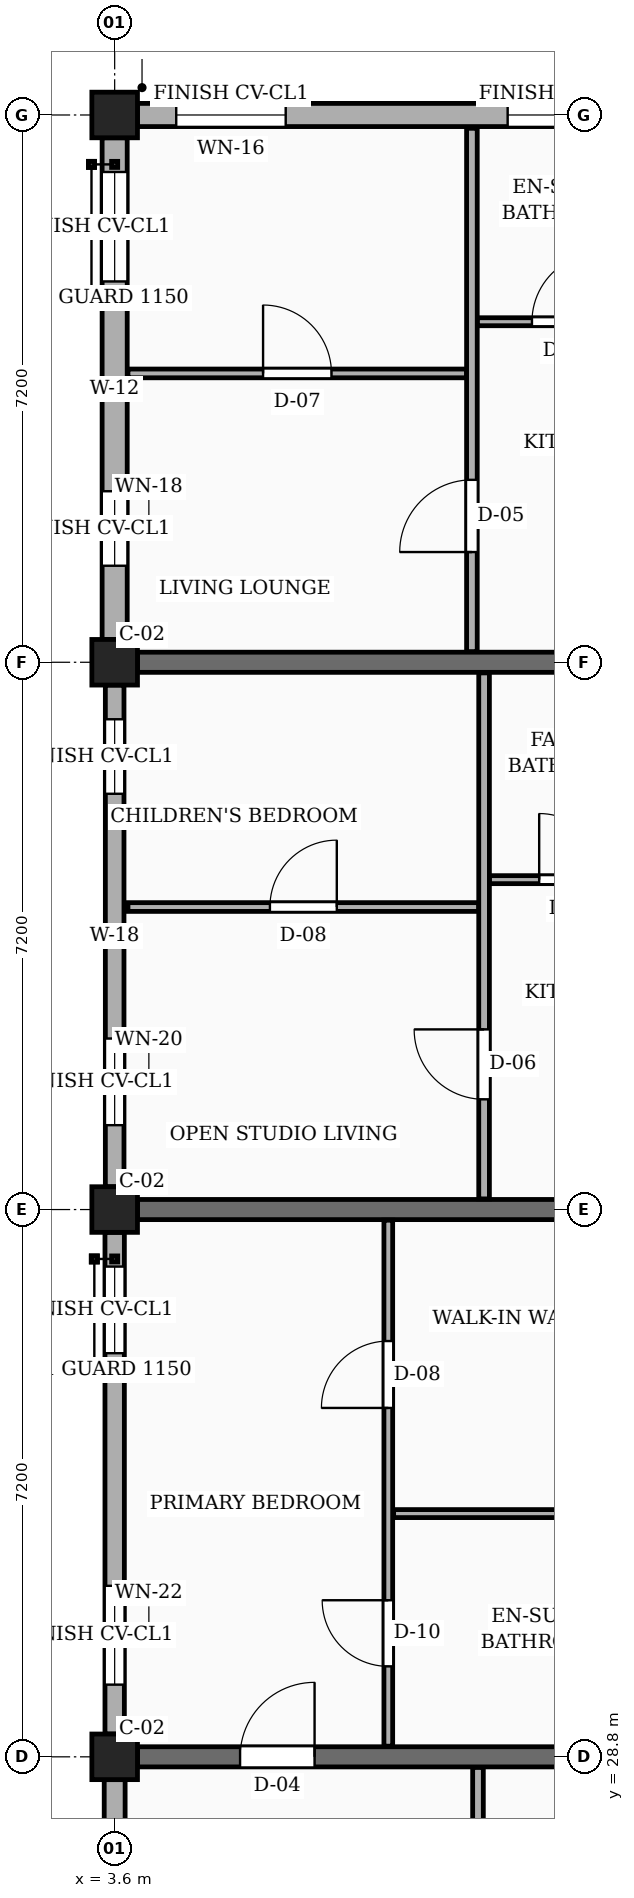
"""IFC4 building model, lengths in metres.
Left out: names, types, materials, properties, quantities, classifications, styles, units other than length and angle.
Written with IfcOpenShell. Run it as: python <this file> out.ifc"""

import sys

from ifc_helpers import new_model, si_unit, direction, frame, frame_2d, origin, origin_2d, place, context, subcontext, project, spatial, rectangle, extrude, element, fill, save


model = new_model("IFC4")
c1 = context("Model", 3, precision=1e-05, world=origin(), true_north=direction((0.0, 1.0)))
c2 = subcontext(c1, "Body", "Model", "MODEL_VIEW")
j1 = project(units=[si_unit("LENGTHUNIT", "METRE"), si_unit("PLANEANGLEUNIT", "RADIAN")], contexts=[c1])
p1 = place(None, origin())
s1 = spatial("IfcSite", under=j1, at=p1, CompositionType="ELEMENT")
p2 = place(p1, origin())
s2 = spatial("IfcBuilding", under=s1, at=p2, CompositionType="ELEMENT")
p3 = place(p2, frame((0.0, 0.0, 7.65)))
s3 = spatial("IfcBuildingStorey", under=s2, at=p3, CompositionType="ELEMENT", Elevation=7.65)
for number, where, z_axis, x_axis in (
    (1, (3.6, 28.8, 0.0), (0.0, 0.0, 1.0), (1.0, 0.0, 0.0)),
    (2, (3.6, 36.0, 0.0), (0.0, 0.0, 1.0), (1.0, 0.0, 0.0)),
    (3, (3.6, 43.2, 0.0), (0.0, 0.0, 1.0), (1.0, 0.0, 0.0)),
    (4, (3.6, 50.4, 0.0), (0.0, 0.0, 1.0), (1.0, 0.0, 0.0)),
):
    element("IfcColumn", number, at=place(p3, frame(where, z_axis=z_axis, x_axis=x_axis)), inside=s3, PredefinedType="COLUMN", context=c2, shape_type="SweptSolid", body=[
        extrude(rectangle(XDim=0.6, YDim=0.6, at=origin_2d()), origin(), (0.0, 0.0, 1.0), 3.15),
    ])
p4 = place(p3, frame((3.9, 28.8, 0.0), z_axis=(0.0, 0.0, 1.0), x_axis=(1.0, 0.0, 0.0)))
e5 = element("IfcWall", 5, at=p4, inside=s3, PredefinedType="SOLIDWALL", context=c2, shape_type="SweptSolid", body=[
    extrude(rectangle(XDim=6.575, YDim=0.265, at=frame_2d((3.288, 0.0))), origin(), (0.0, 0.0, 1.0), 2.17),
])
p5 = place(p4, frame((1.35, 0.0, 0.0)))
e6 = element("IfcOpeningElement", 6, at=p5, cuts=e5, PredefinedType="OPENING", context=c2, shape_type="SweptSolid", body=[
    extrude(rectangle(XDim=0.98, YDim=2.12, at=frame_2d((0.49, 1.06))), frame((0.0, 0.143, 0.0), z_axis=(0.0, -1.0, 0.0), x_axis=(1.0, 0.0, 0.0)), (0.0, 0.0, 1.0), 0.285),
])
for number, where, z_axis, x_axis in (
    (7, (3.9, 36.0, 0.0), (0.0, 0.0, 1.0), (1.0, 0.0, 0.0)),
    (8, (3.9, 43.2, 0.0), (0.0, 0.0, 1.0), (1.0, 0.0, 0.0)),
):
    element("IfcWall", number, at=place(p3, frame(where, z_axis=z_axis, x_axis=x_axis)), inside=s3, PredefinedType="SOLIDWALL", context=c2, shape_type="SweptSolid", body=[
        extrude(rectangle(XDim=6.575, YDim=0.265, at=frame_2d((3.288, 0.0))), origin(), (0.0, 0.0, 1.0), 2.17),
    ])
p6 = place(p3, frame((10.5, 50.4, 0.0), z_axis=(0.0, 0.0, 1.0), x_axis=(-1.0, 0.0, 0.0)))
e9 = element("IfcWall", 9, at=p6, inside=s3, PredefinedType="SOLIDWALL", context=c2, shape_type="SweptSolid", body=[
    extrude(rectangle(XDim=6.6, YDim=0.305, at=frame_2d((3.3, 0.0))), origin(), (0.0, 0.0, 1.0), 2.44),
])
p7 = place(p6, frame((0.45, 0.0, 0.78)))
e10 = element("IfcOpeningElement", 10, at=p7, cuts=e9, PredefinedType="OPENING", context=c2, shape_type="SweptSolid", body=[
    extrude(rectangle(XDim=1.28, YDim=1.26, at=frame_2d((0.64, 0.63))), frame((0.0, 0.163, 0.0), z_axis=(0.0, -1.0, 0.0), x_axis=(1.0, 0.0, 0.0)), (0.0, 0.0, 1.0), 0.325),
])
p8 = place(p6, frame((4.65, 0.0, 0.78)))
e11 = element("IfcOpeningElement", 11, at=p8, cuts=e9, PredefinedType="OPENING", context=c2, shape_type="SweptSolid", body=[
    extrude(rectangle(XDim=1.44, YDim=1.26, at=frame_2d((0.72, 0.63))), frame((0.0, 0.163, 0.0), z_axis=(0.0, -1.0, 0.0), x_axis=(1.0, 0.0, 0.0)), (0.0, 0.0, 1.0), 0.325),
])
p9 = place(p3, frame((3.6, 50.1, 0.0), z_axis=(0.0, 0.0, 1.0), x_axis=(0.0, -1.0, 0.0)))
e12 = element("IfcWall", 12, at=p9, inside=s3, PredefinedType="SOLIDWALL", context=c2, shape_type="SweptSolid", body=[
    extrude(rectangle(XDim=6.6, YDim=0.33, at=frame_2d((3.3, 0.0))), origin(), (0.0, 0.0, 1.0), 2.44),
])
p10 = place(p9, frame((0.45, 0.0, 0.78)))
e13 = element("IfcOpeningElement", 13, at=p10, cuts=e12, PredefinedType="OPENING", context=c2, shape_type="SweptSolid", body=[
    extrude(rectangle(XDim=1.44, YDim=1.26, at=frame_2d((0.72, 0.63))), frame((0.0, 0.175, 0.0), z_axis=(0.0, -1.0, 0.0), x_axis=(1.0, 0.0, 0.0)), (0.0, 0.0, 1.0), 0.35),
])
p11 = place(p9, frame((4.65, 0.0, 0.78)))
e14 = element("IfcOpeningElement", 14, at=p11, cuts=e12, PredefinedType="OPENING", context=c2, shape_type="SweptSolid", body=[
    extrude(rectangle(XDim=0.98, YDim=1.36, at=frame_2d((0.49, 0.68))), frame((0.0, 0.175, 0.0), z_axis=(0.0, -1.0, 0.0), x_axis=(1.0, 0.0, 0.0)), (0.0, 0.0, 1.0), 0.35),
])
p12 = place(p3, frame((3.6, 42.9, 0.0), z_axis=(0.0, 0.0, 1.0), x_axis=(0.0, -1.0, 0.0)))
e15 = element("IfcWall", 15, at=p12, inside=s3, PredefinedType="SOLIDWALL", context=c2, shape_type="SweptSolid", body=[
    extrude(rectangle(XDim=6.6, YDim=0.245, at=frame_2d((3.3, 0.0))), origin(), (0.0, 0.0, 1.0), 2.44),
])
p13 = place(p12, frame((0.45, 0.0, 0.78)))
e16 = element("IfcOpeningElement", 16, at=p13, cuts=e15, PredefinedType="OPENING", context=c2, shape_type="SweptSolid", body=[
    extrude(rectangle(XDim=0.98, YDim=1.36, at=frame_2d((0.49, 0.68))), frame((0.0, 0.133, 0.0), z_axis=(0.0, -1.0, 0.0), x_axis=(1.0, 0.0, 0.0)), (0.0, 0.0, 1.0), 0.265),
])
p14 = place(p12, frame((4.65, 0.0, 0.78)))
e17 = element("IfcOpeningElement", 17, at=p14, cuts=e15, PredefinedType="OPENING", context=c2, shape_type="SweptSolid", body=[
    extrude(rectangle(XDim=1.14, YDim=1.36, at=frame_2d((0.57, 0.68))), frame((0.0, 0.133, 0.0), z_axis=(0.0, -1.0, 0.0), x_axis=(1.0, 0.0, 0.0)), (0.0, 0.0, 1.0), 0.265),
])
p15 = place(p3, frame((3.6, 35.7, 0.0), z_axis=(0.0, 0.0, 1.0), x_axis=(0.0, -1.0, 0.0)))
e18 = element("IfcWall", 18, at=p15, inside=s3, PredefinedType="SOLIDWALL", context=c2, shape_type="SweptSolid", body=[
    extrude(rectangle(XDim=6.6, YDim=0.255, at=frame_2d((3.3, 0.0))), origin(), (0.0, 0.0, 1.0), 2.44),
])
p16 = place(p15, frame((0.45, 0.0, 0.78)))
e19 = element("IfcOpeningElement", 19, at=p16, cuts=e18, PredefinedType="OPENING", context=c2, shape_type="SweptSolid", body=[
    extrude(rectangle(XDim=1.14, YDim=1.36, at=frame_2d((0.57, 0.68))), frame((0.0, 0.137, 0.0), z_axis=(0.0, -1.0, 0.0), x_axis=(1.0, 0.0, 0.0)), (0.0, 0.0, 1.0), 0.275),
])
p17 = place(p15, frame((4.65, 0.0, 0.78)))
e20 = element("IfcOpeningElement", 20, at=p17, cuts=e18, PredefinedType="OPENING", context=c2, shape_type="SweptSolid", body=[
    extrude(rectangle(XDim=1.3, YDim=1.36, at=frame_2d((0.65, 0.68))), frame((0.0, 0.137, 0.0), z_axis=(0.0, -1.0, 0.0), x_axis=(1.0, 0.0, 0.0)), (0.0, 0.0, 1.0), 0.275),
])
p18 = place(p3, frame((3.6, 28.5, 0.0), z_axis=(0.0, 0.0, 1.0), x_axis=(0.0, -1.0, 0.0)))
e21 = element("IfcWall", 21, at=p18, inside=s3, PredefinedType="SOLIDWALL", context=c2, shape_type="SweptSolid", body=[
    extrude(rectangle(XDim=3.88, YDim=0.275, at=frame_2d((1.94, 0.0))), origin(), (0.0, 0.0, 1.0), 2.44),
])
p19 = place(p18, frame((0.815, 0.0, 0.78)))
e22 = element("IfcOpeningElement", 22, at=p19, cuts=e21, PredefinedType="OPENING", context=c2, shape_type="SweptSolid", body=[
    extrude(rectangle(XDim=1.3, YDim=1.36, at=frame_2d((0.65, 0.68))), frame((0.0, 0.147, 0.0), z_axis=(0.0, -1.0, 0.0), x_axis=(1.0, 0.0, 0.0)), (0.0, 0.0, 1.0), 0.295),
])
p20 = place(p3, frame((8.38, 21.74, 0.0), z_axis=(0.0, 0.0, 1.0), x_axis=(0.0, 1.0, 0.0)))
e23 = element("IfcWall", 23, at=p20, inside=s3, PredefinedType="PARTITIONING", context=c2, shape_type="SweptSolid", body=[
    extrude(rectangle(XDim=6.92, YDim=0.14, at=frame_2d((3.46, 0.0))), origin(), (0.0, 0.0, 1.0), 2.305),
])
p21 = place(p20, frame((1.31, 0.0, 0.0)))
e24 = element("IfcOpeningElement", 24, at=p21, cuts=e23, PredefinedType="OPENING", context=c2, shape_type="SweptSolid", body=[
    extrude(rectangle(XDim=0.92, YDim=2.1, at=frame_2d((0.46, 1.05))), frame((0.0, 0.08, 0.0), z_axis=(0.0, -1.0, 0.0), x_axis=(1.0, 0.0, 0.0)), (0.0, 0.0, 1.0), 0.16),
])
p22 = place(p3, frame((7.2, 28.94, 0.0), z_axis=(0.0, 0.0, 1.0), x_axis=(0.0, 1.0, 0.0)))
e25 = element("IfcWall", 25, at=p22, inside=s3, PredefinedType="PARTITIONING", context=c2, shape_type="SweptSolid", body=[
    extrude(rectangle(XDim=6.92, YDim=0.115, at=frame_2d((3.46, 0.0))), origin(), (0.0, 0.0, 1.0), 2.305),
])
p23 = place(p22, frame((1.05, 0.0, 0.0)))
e26 = element("IfcOpeningElement", 26, at=p23, cuts=e25, PredefinedType="OPENING", context=c2, shape_type="SweptSolid", body=[
    extrude(rectangle(XDim=0.87, YDim=2.05, at=frame_2d((0.435, 1.025))), frame((0.0, 0.067, 0.0), z_axis=(0.0, -1.0, 0.0), x_axis=(1.0, 0.0, 0.0)), (0.0, 0.0, 1.0), 0.135),
])
p24 = place(p22, frame((4.45, 0.0, 0.0)))
e27 = element("IfcOpeningElement", 27, at=p24, cuts=e25, PredefinedType="OPENING", context=c2, shape_type="SweptSolid", body=[
    extrude(rectangle(XDim=0.88, YDim=2.08, at=frame_2d((0.44, 1.04))), frame((0.0, 0.067, 0.0), z_axis=(0.0, -1.0, 0.0), x_axis=(1.0, 0.0, 0.0)), (0.0, 0.0, 1.0), 0.135),
])
p25 = place(p3, frame((7.27, 32.0, 0.0), z_axis=(0.0, 0.0, 1.0), x_axis=(1.0, 0.0, 0.0)))
e28 = element("IfcWall", 28, at=p25, inside=s3, PredefinedType="PARTITIONING", context=c2, shape_type="SweptSolid", body=[
    extrude(rectangle(XDim=3.39, YDim=0.105, at=frame_2d((1.695, 0.0))), origin(), (0.0, 0.0, 1.0), 2.305),
])
p26 = place(p3, frame((3.775, 39.98, 0.0), z_axis=(0.0, 0.0, 1.0), x_axis=(1.0, 0.0, 0.0)))
e29 = element("IfcWall", 29, at=p26, inside=s3, PredefinedType="PARTITIONING", context=c2, shape_type="SweptSolid", body=[
    extrude(rectangle(XDim=4.615, YDim=0.115, at=frame_2d((2.308, 0.0))), origin(), (0.0, 0.0, 1.0), 2.305),
])
p27 = place(p26, frame((1.867, 0.0, 0.0)))
e30 = element("IfcOpeningElement", 30, at=p27, cuts=e29, PredefinedType="OPENING", context=c2, shape_type="SweptSolid", body=[
    extrude(rectangle(XDim=0.88, YDim=2.08, at=frame_2d((0.44, 1.04))), frame((0.0, 0.067, 0.0), z_axis=(0.0, -1.0, 0.0), x_axis=(1.0, 0.0, 0.0)), (0.0, 0.0, 1.0), 0.135),
])
p28 = place(p3, frame((8.53, 40.34, 0.0), z_axis=(0.0, 0.0, 1.0), x_axis=(1.0, 0.0, 0.0)))
e31 = element("IfcWall", 31, at=p28, inside=s3, PredefinedType="PARTITIONING", context=c2, shape_type="SweptSolid", body=[
    extrude(rectangle(XDim=2.18, YDim=0.105, at=frame_2d((1.09, 0.0))), origin(), (0.0, 0.0, 1.0), 2.305),
])
p29 = place(p28, frame((0.655, 0.0, 0.0)))
e32 = element("IfcOpeningElement", 32, at=p29, cuts=e31, PredefinedType="OPENING", context=c2, shape_type="SweptSolid", body=[
    extrude(rectangle(XDim=0.87, YDim=2.05, at=frame_2d((0.435, 1.025))), frame((0.0, 0.062, 0.0), z_axis=(0.0, -1.0, 0.0), x_axis=(1.0, 0.0, 0.0)), (0.0, 0.0, 1.0), 0.125),
])
p30 = place(p3, frame((8.46, 36.14, 0.0), z_axis=(0.0, 0.0, 1.0), x_axis=(0.0, 1.0, 0.0)))
e33 = element("IfcWall", 33, at=p30, inside=s3, PredefinedType="PARTITIONING", context=c2, shape_type="SweptSolid", body=[
    extrude(rectangle(XDim=6.92, YDim=0.14, at=frame_2d((3.46, 0.0))), origin(), (0.0, 0.0, 1.0), 2.305),
])
p31 = place(p30, frame((1.31, 0.0, 0.0)))
e34 = element("IfcOpeningElement", 34, at=p31, cuts=e33, PredefinedType="OPENING", context=c2, shape_type="SweptSolid", body=[
    extrude(rectangle(XDim=0.92, YDim=2.1, at=frame_2d((0.46, 1.05))), frame((0.0, 0.08, 0.0), z_axis=(0.0, -1.0, 0.0), x_axis=(1.0, 0.0, 0.0)), (0.0, 0.0, 1.0), 0.16),
])
p32 = place(p3, frame((3.775, 47.0, 0.0), z_axis=(0.0, 0.0, 1.0), x_axis=(1.0, 0.0, 0.0)))
e35 = element("IfcWall", 35, at=p32, inside=s3, PredefinedType="PARTITIONING", context=c2, shape_type="SweptSolid", body=[
    extrude(rectangle(XDim=4.455, YDim=0.115, at=frame_2d((2.228, 0.0))), origin(), (0.0, 0.0, 1.0), 2.305),
])
p33 = place(p32, frame((1.778, 0.0, 0.0)))
e36 = element("IfcOpeningElement", 36, at=p33, cuts=e35, PredefinedType="OPENING", context=c2, shape_type="SweptSolid", body=[
    extrude(rectangle(XDim=0.9, YDim=2.1, at=frame_2d((0.45, 1.05))), frame((0.0, 0.067, 0.0), z_axis=(0.0, -1.0, 0.0), x_axis=(1.0, 0.0, 0.0)), (0.0, 0.0, 1.0), 0.135),
])
p34 = place(p3, frame((8.37, 47.68, 0.0), z_axis=(0.0, 0.0, 1.0), x_axis=(1.0, 0.0, 0.0)))
e37 = element("IfcWall", 37, at=p34, inside=s3, PredefinedType="PARTITIONING", context=c2, shape_type="SweptSolid", body=[
    extrude(rectangle(XDim=2.34, YDim=0.105, at=frame_2d((1.17, 0.0))), origin(), (0.0, 0.0, 1.0), 2.305),
])
p35 = place(p34, frame((0.72, 0.0, 0.0)))
e38 = element("IfcOpeningElement", 38, at=p35, cuts=e37, PredefinedType="OPENING", context=c2, shape_type="SweptSolid", body=[
    extrude(rectangle(XDim=0.9, YDim=2.05, at=frame_2d((0.45, 1.025))), frame((0.0, 0.062, 0.0), z_axis=(0.0, -1.0, 0.0), x_axis=(1.0, 0.0, 0.0)), (0.0, 0.0, 1.0), 0.125),
])
p36 = place(p3, frame((8.3, 43.34, 0.0), z_axis=(0.0, 0.0, 1.0), x_axis=(0.0, 1.0, 0.0)))
e39 = element("IfcWall", 39, at=p36, inside=s3, PredefinedType="PARTITIONING", context=c2, shape_type="SweptSolid", body=[
    extrude(rectangle(XDim=6.885, YDim=0.14, at=frame_2d((3.442, 0.0))), origin(), (0.0, 0.0, 1.0), 2.305),
])
p37 = place(p36, frame((1.31, 0.0, 0.0)))
e40 = element("IfcOpeningElement", 40, at=p37, cuts=e39, PredefinedType="OPENING", context=c2, shape_type="SweptSolid", body=[
    extrude(rectangle(XDim=0.95, YDim=2.1, at=frame_2d((0.475, 1.05))), frame((0.0, 0.08, 0.0), z_axis=(0.0, -1.0, 0.0), x_axis=(1.0, 0.0, 0.0)), (0.0, 0.0, 1.0), 0.16),
])
p38 = place(p7, origin())
e41 = element("IfcWindow", 41, at=p38, inside=s3, PartitioningType="SINGLE_PANEL", PredefinedType="WINDOW", context=c2, shape_type="SweptSolid", body=[
    extrude(rectangle(XDim=1.28, YDim=1.26, at=frame_2d((0.64, 0.63))), frame((0.0, 0.03, 0.0), z_axis=(0.0, -1.0, 0.0), x_axis=(1.0, 0.0, 0.0)), (0.0, 0.0, 1.0), 0.06),
])
fill(e10, e41)
p39 = place(p8, origin())
e42 = element("IfcWindow", 42, at=p39, inside=s3, PartitioningType="SINGLE_PANEL", PredefinedType="WINDOW", context=c2, shape_type="SweptSolid", body=[
    extrude(rectangle(XDim=1.44, YDim=1.26, at=frame_2d((0.72, 0.63))), frame((0.0, 0.03, 0.0), z_axis=(0.0, -1.0, 0.0), x_axis=(1.0, 0.0, 0.0)), (0.0, 0.0, 1.0), 0.06),
])
fill(e11, e42)
p40 = place(p10, origin())
e43 = element("IfcWindow", 43, at=p40, inside=s3, PartitioningType="SINGLE_PANEL", PredefinedType="WINDOW", context=c2, shape_type="SweptSolid", body=[
    extrude(rectangle(XDim=1.44, YDim=1.26, at=frame_2d((0.72, 0.63))), frame((0.0, 0.03, 0.0), z_axis=(0.0, -1.0, 0.0), x_axis=(1.0, 0.0, 0.0)), (0.0, 0.0, 1.0), 0.06),
])
fill(e13, e43)
p41 = place(p11, origin())
e44 = element("IfcWindow", 44, at=p41, inside=s3, PartitioningType="SINGLE_PANEL", PredefinedType="WINDOW", context=c2, shape_type="SweptSolid", body=[
    extrude(rectangle(XDim=0.98, YDim=1.36, at=frame_2d((0.49, 0.68))), frame((0.0, 0.03, 0.0), z_axis=(0.0, -1.0, 0.0), x_axis=(1.0, 0.0, 0.0)), (0.0, 0.0, 1.0), 0.06),
])
fill(e14, e44)
p42 = place(p13, origin())
e45 = element("IfcWindow", 45, at=p42, inside=s3, PartitioningType="SINGLE_PANEL", PredefinedType="WINDOW", context=c2, shape_type="SweptSolid", body=[
    extrude(rectangle(XDim=0.98, YDim=1.36, at=frame_2d((0.49, 0.68))), frame((0.0, 0.03, 0.0), z_axis=(0.0, -1.0, 0.0), x_axis=(1.0, 0.0, 0.0)), (0.0, 0.0, 1.0), 0.06),
])
fill(e16, e45)
p43 = place(p14, origin())
e46 = element("IfcWindow", 46, at=p43, inside=s3, PartitioningType="SINGLE_PANEL", PredefinedType="WINDOW", context=c2, shape_type="SweptSolid", body=[
    extrude(rectangle(XDim=1.14, YDim=1.36, at=frame_2d((0.57, 0.68))), frame((0.0, 0.03, 0.0), z_axis=(0.0, -1.0, 0.0), x_axis=(1.0, 0.0, 0.0)), (0.0, 0.0, 1.0), 0.06),
])
fill(e17, e46)
p44 = place(p16, origin())
e47 = element("IfcWindow", 47, at=p44, inside=s3, PartitioningType="SINGLE_PANEL", PredefinedType="WINDOW", context=c2, shape_type="SweptSolid", body=[
    extrude(rectangle(XDim=1.14, YDim=1.36, at=frame_2d((0.57, 0.68))), frame((0.0, 0.03, 0.0), z_axis=(0.0, -1.0, 0.0), x_axis=(1.0, 0.0, 0.0)), (0.0, 0.0, 1.0), 0.06),
])
fill(e19, e47)
p45 = place(p17, origin())
e48 = element("IfcWindow", 48, at=p45, inside=s3, PartitioningType="SINGLE_PANEL", PredefinedType="WINDOW", context=c2, shape_type="SweptSolid", body=[
    extrude(rectangle(XDim=1.3, YDim=1.36, at=frame_2d((0.65, 0.68))), frame((0.0, 0.03, 0.0), z_axis=(0.0, -1.0, 0.0), x_axis=(1.0, 0.0, 0.0)), (0.0, 0.0, 1.0), 0.06),
])
fill(e20, e48)
p46 = place(p23, origin())
e49 = element("IfcDoor", 49, at=p46, inside=s3, OperationType="SINGLE_SWING_RIGHT", PredefinedType="DOOR", context=c2, shape_type="SweptSolid", body=[
    extrude(rectangle(XDim=0.87, YDim=2.05, at=frame_2d((0.435, 1.025))), frame((0.0, 0.025, 0.0), z_axis=(0.0, -1.0, 0.0), x_axis=(1.0, 0.0, 0.0)), (0.0, 0.0, 1.0), 0.05),
])
fill(e26, e49)
p47 = place(p24, origin())
e50 = element("IfcDoor", 50, at=p47, inside=s3, OperationType="SINGLE_SWING_LEFT", PredefinedType="DOOR", context=c2, shape_type="SweptSolid", body=[
    extrude(rectangle(XDim=0.88, YDim=2.08, at=frame_2d((0.44, 1.04))), frame((0.0, 0.025, 0.0), z_axis=(0.0, -1.0, 0.0), x_axis=(1.0, 0.0, 0.0)), (0.0, 0.0, 1.0), 0.05),
])
fill(e27, e50)
p48 = place(p27, origin())
e51 = element("IfcDoor", 51, at=p48, inside=s3, OperationType="SINGLE_SWING_RIGHT", PredefinedType="DOOR", context=c2, shape_type="SweptSolid", body=[
    extrude(rectangle(XDim=0.88, YDim=2.08, at=frame_2d((0.44, 1.04))), frame((0.0, 0.025, 0.0), z_axis=(0.0, -1.0, 0.0), x_axis=(1.0, 0.0, 0.0)), (0.0, 0.0, 1.0), 0.05),
])
fill(e30, e51)
p49 = place(p29, origin())
e52 = element("IfcDoor", 52, at=p49, inside=s3, OperationType="SINGLE_SWING_LEFT", PredefinedType="DOOR", context=c2, shape_type="SweptSolid", body=[
    extrude(rectangle(XDim=0.87, YDim=2.05, at=frame_2d((0.435, 1.025))), frame((0.0, 0.025, 0.0), z_axis=(0.0, -1.0, 0.0), x_axis=(1.0, 0.0, 0.0)), (0.0, 0.0, 1.0), 0.05),
])
fill(e32, e52)
p50 = place(p31, origin())
e53 = element("IfcDoor", 53, at=p50, inside=s3, OperationType="SINGLE_SWING_RIGHT", PredefinedType="DOOR", context=c2, shape_type="SweptSolid", body=[
    extrude(rectangle(XDim=0.92, YDim=2.1, at=frame_2d((0.46, 1.05))), frame((0.0, 0.025, 0.0), z_axis=(0.0, -1.0, 0.0), x_axis=(1.0, 0.0, 0.0)), (0.0, 0.0, 1.0), 0.05),
])
fill(e34, e53)
p51 = place(p33, origin())
e54 = element("IfcDoor", 54, at=p51, inside=s3, OperationType="SINGLE_SWING_LEFT", PredefinedType="DOOR", context=c2, shape_type="SweptSolid", body=[
    extrude(rectangle(XDim=0.9, YDim=2.1, at=frame_2d((0.45, 1.05))), frame((0.0, 0.025, 0.0), z_axis=(0.0, -1.0, 0.0), x_axis=(1.0, 0.0, 0.0)), (0.0, 0.0, 1.0), 0.05),
])
fill(e36, e54)
p52 = place(p35, origin())
e55 = element("IfcDoor", 55, at=p52, inside=s3, OperationType="SINGLE_SWING_RIGHT", PredefinedType="DOOR", context=c2, shape_type="SweptSolid", body=[
    extrude(rectangle(XDim=0.9, YDim=2.05, at=frame_2d((0.45, 1.025))), frame((0.0, 0.025, 0.0), z_axis=(0.0, -1.0, 0.0), x_axis=(1.0, 0.0, 0.0)), (0.0, 0.0, 1.0), 0.05),
])
fill(e38, e55)
p53 = place(p37, origin())
e56 = element("IfcDoor", 56, at=p53, inside=s3, OperationType="SINGLE_SWING_LEFT", PredefinedType="DOOR", context=c2, shape_type="SweptSolid", body=[
    extrude(rectangle(XDim=0.95, YDim=2.1, at=frame_2d((0.475, 1.05))), frame((0.0, 0.025, 0.0), z_axis=(0.0, -1.0, 0.0), x_axis=(1.0, 0.0, 0.0)), (0.0, 0.0, 1.0), 0.05),
])
fill(e40, e56)
p54 = place(p5, origin())
e57 = element("IfcDoor", 57, at=p54, inside=s3, OperationType="SINGLE_SWING_RIGHT", PredefinedType="DOOR", context=c2, shape_type="SweptSolid", body=[
    extrude(rectangle(XDim=0.98, YDim=2.12, at=frame_2d((0.49, 1.06))), frame((0.0, 0.025, 0.0), z_axis=(0.0, -1.0, 0.0), x_axis=(1.0, 0.0, 0.0)), (0.0, 0.0, 1.0), 0.05),
])
fill(e6, e57)
save(model, sys.argv[1])
